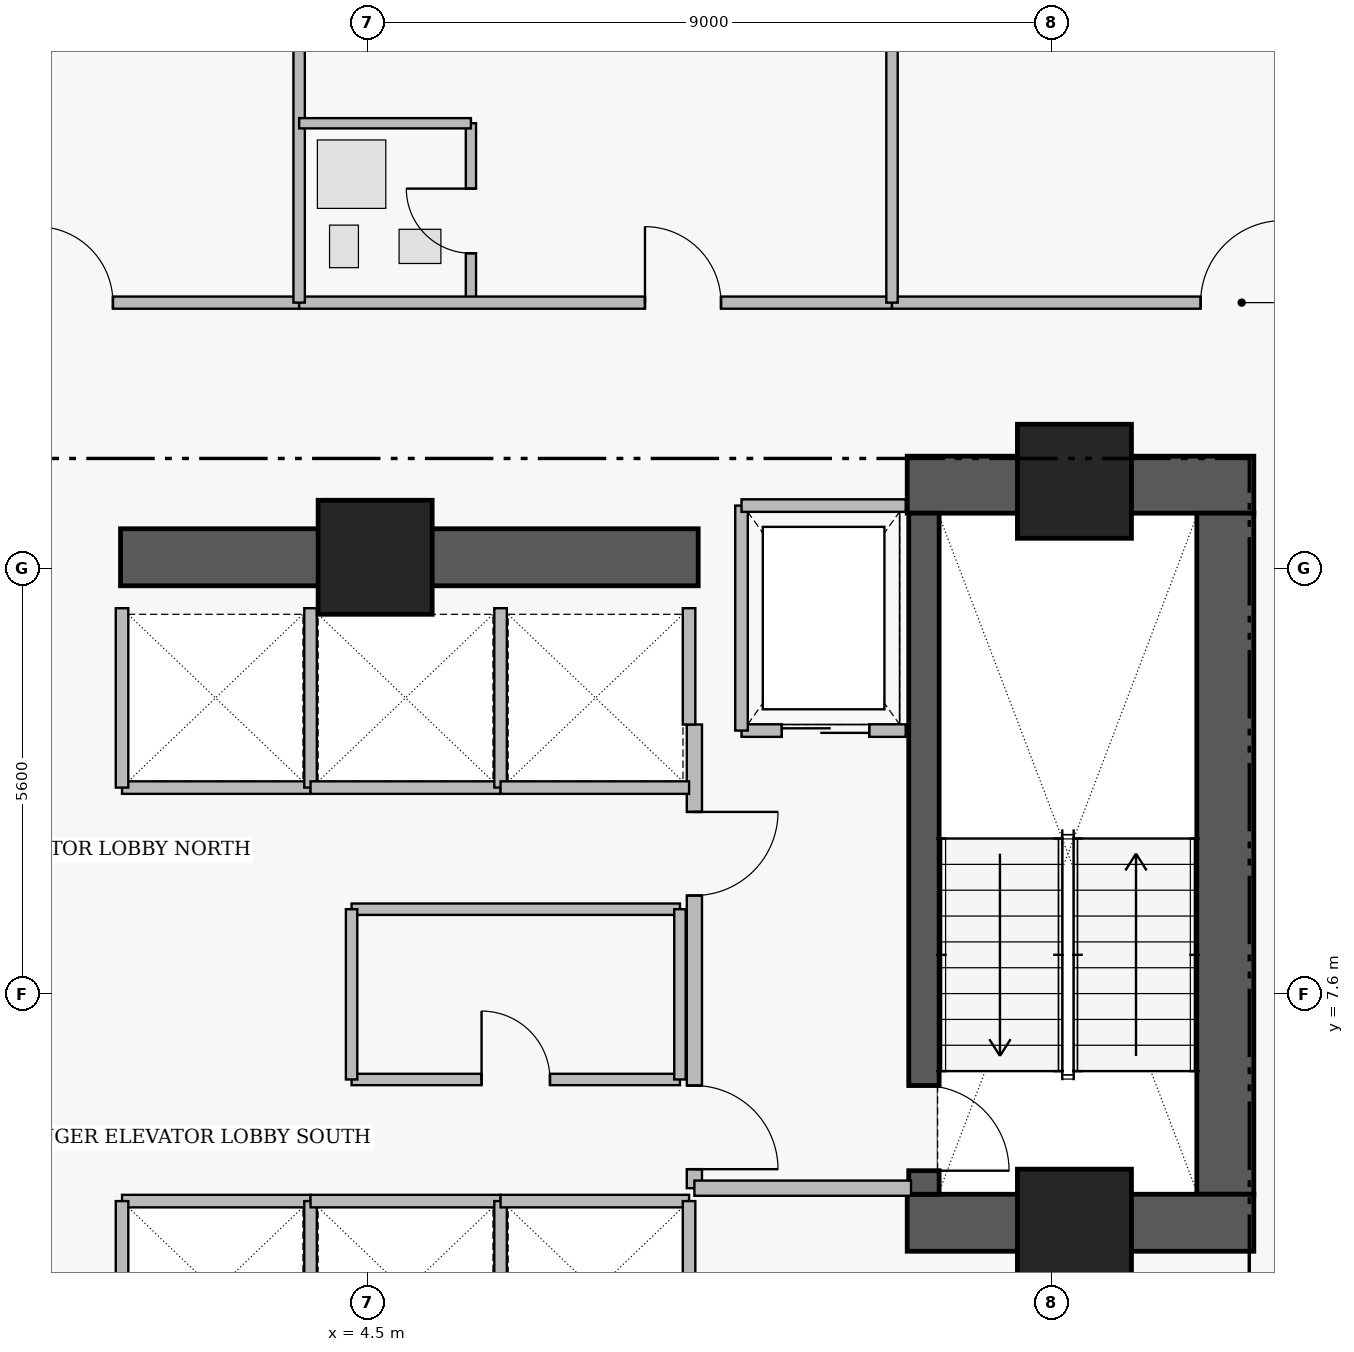
"""IFC4 building model, lengths in metres.
Left out: names, types, materials, properties, quantities, classifications, styles, units other than length and angle.
Written with IfcOpenShell. Run it as: python <this file> out.ifc"""

import sys

from ifc_helpers import new_model, si_unit, direction, frame, frame_2d, origin, origin_2d, place, context, subcontext, project, spatial, rectangle, extrude, element, fill, save


model = new_model("IFC4")
c1 = context("Model", 3, precision=1e-05, world=origin(), true_north=direction((0.0, 1.0)))
c2 = subcontext(c1, "Body", "Model", "MODEL_VIEW")
j1 = project(units=[si_unit("LENGTHUNIT", "METRE"), si_unit("PLANEANGLEUNIT", "RADIAN")], contexts=[c1])
p1 = place(None, origin())
s1 = spatial("IfcSite", under=j1, at=p1, CompositionType="ELEMENT")
p2 = place(p1, origin())
s2 = spatial("IfcBuilding", under=s1, at=p2, CompositionType="ELEMENT")
p3 = place(p2, frame((0.0, 0.0, 117.55)))
s3 = spatial("IfcBuildingStorey", under=s2, at=p3, CompositionType="ELEMENT", Elevation=117.55)
p4 = place(p3, frame((11.6, 14.305, 0.0), z_axis=(0.0, 0.0, 1.0), x_axis=(1.0, 0.0, 0.0)))
e1 = element("IfcWall", 1, at=p4, inside=s3, PredefinedType="SHEAR", context=c2, shape_type="SweptSolid", body=[
    extrude(rectangle(XDim=4.56, YDim=0.75, at=frame_2d((2.28, 0.0))), origin(), (0.0, 0.0, 1.0), 3.46),
])
p5 = place(p3, frame((15.785, 4.97, 0.0), z_axis=(0.0, 0.0, 1.0), x_axis=(0.0, 1.0, 0.0)))
e2 = element("IfcWall", 2, at=p5, inside=s3, PredefinedType="SHEAR", context=c2, shape_type="SweptSolid", body=[
    extrude(rectangle(XDim=8.96, YDim=0.75, at=frame_2d((4.48, 0.0))), origin(), (0.0, 0.0, 1.0), 3.46),
])
p6 = place(p3, frame((11.6, 4.595, 0.0), z_axis=(0.0, 0.0, 1.0), x_axis=(1.0, 0.0, 0.0)))
e3 = element("IfcWall", 3, at=p6, inside=s3, PredefinedType="SHEAR", context=c2, shape_type="SweptSolid", body=[
    extrude(rectangle(XDim=4.56, YDim=0.75, at=frame_2d((2.28, 0.0))), origin(), (0.0, 0.0, 1.0), 3.46),
])
p7 = place(p3, frame((1.25, 13.35, 0.0), z_axis=(0.0, 0.0, 1.0), x_axis=(1.0, 0.0, 0.0)))
e4 = element("IfcWall", 4, at=p7, inside=s3, PredefinedType="SHEAR", context=c2, shape_type="SweptSolid", body=[
    extrude(rectangle(XDim=7.6, YDim=0.75, at=frame_2d((3.8, 0.0))), origin(), (0.0, 0.0, 1.0), 3.43),
])
p8 = place(p3, frame((11.82, 13.93, 0.0), z_axis=(0.0, 0.0, 1.0), x_axis=(0.0, -1.0, 0.0)))
e5 = element("IfcWall", 5, at=p8, inside=s3, PredefinedType="SHEAR", context=c2, shape_type="SweptSolid", body=[
    extrude(rectangle(XDim=8.96, YDim=0.4, at=frame_2d((4.48, 0.0))), origin(), (0.0, 0.0, 1.0), 3.46),
])
p9 = place(p8, frame((7.53, 0.0, 0.0)))
e6 = element("IfcOpeningElement", 6, at=p9, cuts=e5, PredefinedType="OPENING", context=c2, shape_type="SweptSolid", body=[
    extrude(rectangle(XDim=1.12, YDim=2.22, at=frame_2d((0.56, 1.11))), frame((0.0, 0.21, 0.0), z_axis=(0.0, -1.0, 0.0), x_axis=(1.0, 0.0, 0.0)), (0.0, 0.0, 1.0), 0.42),
])
for number, where, z_axis, x_axis in (
    (7, (4.6, 13.35, 0.0), (0.0, 0.0, 1.0), (1.0, 0.0, 0.0)),
    (8, (13.8, 14.35, 0.0), (0.0, 0.0, 1.0), (1.0, 0.0, 0.0)),
    (9, (13.8, 4.55, 0.0), (0.0, 0.0, 1.0), (1.0, 0.0, 0.0)),
):
    element("IfcColumn", number, at=place(p3, frame(where, z_axis=z_axis, x_axis=x_axis)), inside=s3, PredefinedType="COLUMN", context=c2, shape_type="SweptSolid", body=[
        extrude(rectangle(XDim=1.5, YDim=1.5, at=origin_2d()), origin(), (0.0, 0.0, 1.0), 3.65),
    ])
p10 = place(p3, frame((8.8, 11.15, 0.0), z_axis=(0.0, 0.0, 1.0), x_axis=(0.0, -1.0, 0.0)))
e10 = element("IfcWall", 10, at=p10, inside=s3, PredefinedType="PARTITIONING", context=c2, shape_type="SweptSolid", body=[
    extrude(rectangle(XDim=6.1, YDim=0.2, at=frame_2d((3.05, 0.0))), origin(), (0.0, 0.0, 1.0), 3.43),
])
p11 = place(p10, frame((1.15, 0.0, 0.0)))
e11 = element("IfcOpeningElement", 11, at=p11, cuts=e10, PredefinedType="OPENING", context=c2, shape_type="SweptSolid", body=[
    extrude(rectangle(XDim=1.1, YDim=2.2, at=frame_2d((0.55, 1.1))), frame((0.0, 0.11, 0.0), z_axis=(0.0, -1.0, 0.0), x_axis=(1.0, 0.0, 0.0)), (0.0, 0.0, 1.0), 0.22),
])
p12 = place(p10, frame((4.75, 0.0, 0.0)))
e12 = element("IfcOpeningElement", 12, at=p12, cuts=e10, PredefinedType="OPENING", context=c2, shape_type="SweptSolid", body=[
    extrude(rectangle(XDim=1.1, YDim=2.2, at=frame_2d((0.55, 1.1))), frame((0.0, 0.11, 0.0), z_axis=(0.0, -1.0, 0.0), x_axis=(1.0, 0.0, 0.0)), (0.0, 0.0, 1.0), 0.22),
])
p13 = place(p3, frame((9.42, 11.07, 0.0), z_axis=(0.0, 0.0, 1.0), x_axis=(1.0, 0.0, 0.0)))
e13 = element("IfcWall", 13, at=p13, inside=s3, PredefinedType="PARTITIONING", context=c2, shape_type="SweptSolid", body=[
    extrude(rectangle(XDim=2.16, YDim=0.165, at=frame_2d((1.08, 0.0))), origin(), (0.0, 0.0, 1.0), 3.43),
])
p14 = place(p13, frame((0.53, 0.0, 0.0)))
e14 = element("IfcOpeningElement", 14, at=p14, cuts=e13, PredefinedType="OPENING", context=c2, shape_type="SweptSolid", body=[
    extrude(rectangle(XDim=1.15, YDim=2.25, at=frame_2d((0.575, 1.125))), frame((0.0, 0.093, 0.0), z_axis=(0.0, -1.0, 0.0), x_axis=(1.0, 0.0, 0.0)), (0.0, 0.0, 1.0), 0.185),
])
p15 = place(p3, frame((4.29, 6.48, 0.0), z_axis=(0.0, 0.0, 1.0), x_axis=(1.0, 0.0, 0.0)))
e15 = element("IfcWall", 15, at=p15, inside=s3, PredefinedType="PARTITIONING", context=c2, shape_type="SweptSolid", body=[
    extrude(rectangle(XDim=4.32, YDim=0.15, at=frame_2d((2.16, 0.0))), origin(), (0.0, 0.0, 1.0), 3.43),
])
p16 = place(p15, frame((1.71, 0.0, 0.0)))
e16 = element("IfcOpeningElement", 16, at=p16, cuts=e15, PredefinedType="OPENING", context=c2, shape_type="SweptSolid", body=[
    extrude(rectangle(XDim=0.9, YDim=2.15, at=frame_2d((0.45, 1.075))), frame((0.0, 0.085, 0.0), z_axis=(0.0, -1.0, 0.0), x_axis=(1.0, 0.0, 0.0)), (0.0, 0.0, 1.0), 0.17),
])
p17 = place(p3, frame((-4.6, 16.7, 0.0), z_axis=(0.0, 0.0, 1.0), x_axis=(1.0, 0.0, 0.0)))
e17 = element("IfcWall", 17, at=p17, inside=s3, PredefinedType="PARTITIONING", context=c2, shape_type="SweptSolid", body=[
    extrude(rectangle(XDim=8.2, YDim=0.16, at=frame_2d((4.1, 0.0))), origin(), (0.0, 0.0, 1.0), 2.973),
])
p18 = place(p17, frame((4.75, 0.0, 0.0)))
e18 = element("IfcOpeningElement", 18, at=p18, cuts=e17, PredefinedType="OPENING", context=c2, shape_type="SweptSolid", body=[
    extrude(rectangle(XDim=1.0, YDim=2.15, at=frame_2d((0.5, 1.075))), frame((0.0, 0.09, 0.0), z_axis=(0.0, -1.0, 0.0), x_axis=(1.0, 0.0, 0.0)), (0.0, 0.0, 1.0), 0.18),
])
p19 = place(p3, frame((5.86, 16.7, 0.0), z_axis=(0.0, 0.0, 1.0), x_axis=(0.0, 1.0, 0.0)))
e19 = element("IfcWall", 19, at=p19, inside=s3, PredefinedType="PLUMBINGWALL", context=c2, shape_type="SweptSolid", body=[
    extrude(rectangle(XDim=2.36, YDim=0.135, at=frame_2d((1.18, 0.0))), origin(), (0.0, 0.0, 1.0), 3.43),
])
p20 = place(p19, frame((0.65, 0.0, 0.0)))
e20 = element("IfcOpeningElement", 20, at=p20, cuts=e19, PredefinedType="OPENING", context=c2, shape_type="SweptSolid", body=[
    extrude(rectangle(XDim=0.85, YDim=2.1, at=frame_2d((0.425, 1.05))), frame((0.0, 0.077, 0.0), z_axis=(0.0, -1.0, 0.0), x_axis=(1.0, 0.0, 0.0)), (0.0, 0.0, 1.0), 0.155),
])
p21 = place(p3, frame((3.6, 16.7, 0.0), z_axis=(0.0, 0.0, 1.0), x_axis=(1.0, 0.0, 0.0)))
e21 = element("IfcWall", 21, at=p21, inside=s3, PredefinedType="PARTITIONING", context=c2, shape_type="SweptSolid", body=[
    extrude(rectangle(XDim=7.8, YDim=0.16, at=frame_2d((3.9, 0.0))), origin(), (0.0, 0.0, 1.0), 2.973),
])
p22 = place(p21, frame((4.55, 0.0, 0.0)))
e22 = element("IfcOpeningElement", 22, at=p22, cuts=e21, PredefinedType="OPENING", context=c2, shape_type="SweptSolid", body=[
    extrude(rectangle(XDim=1.0, YDim=2.15, at=frame_2d((0.5, 1.075))), frame((0.0, 0.09, 0.0), z_axis=(0.0, -1.0, 0.0), x_axis=(1.0, 0.0, 0.0)), (0.0, 0.0, 1.0), 0.18),
])
p23 = place(p3, frame((11.4, 16.7, 0.0), z_axis=(0.0, 0.0, 1.0), x_axis=(1.0, 0.0, 0.0)))
e23 = element("IfcWall", 23, at=p23, inside=s3, PredefinedType="PARTITIONING", context=c2, shape_type="SweptSolid", body=[
    extrude(rectangle(XDim=9.2, YDim=0.16, at=frame_2d((4.6, 0.0))), origin(), (0.0, 0.0, 1.0), 2.973),
])
p24 = place(p23, frame((4.06, 0.0, 0.0)))
e24 = element("IfcOpeningElement", 24, at=p24, cuts=e23, PredefinedType="OPENING", context=c2, shape_type="SweptSolid", body=[
    extrude(rectangle(XDim=1.08, YDim=2.18, at=frame_2d((0.54, 1.09))), frame((0.0, 0.09, 0.0), z_axis=(0.0, -1.0, 0.0), x_axis=(1.0, 0.0, 0.0)), (0.0, 0.0, 1.0), 0.18),
])
p25 = place(p3, frame((8.8, 5.05, 0.0), z_axis=(0.0, 0.0, 1.0), x_axis=(1.0, 0.0, 0.0)))
e25 = element("IfcWall", 25, at=p25, inside=s3, PredefinedType="PARTITIONING", context=c2, shape_type="SweptSolid", body=[
    extrude(rectangle(XDim=2.85, YDim=0.2, at=frame_2d((1.425, 0.0))), origin(), (0.0, 0.0, 1.0), 3.43),
])
p26 = place(p3, frame((9.42, 11.07, 0.0), z_axis=(0.0, 0.0, 1.0), x_axis=(0.0, 1.0, 0.0)))
e26 = element("IfcWall", 26, at=p26, inside=s3, PredefinedType="PARTITIONING", context=c2, shape_type="SweptSolid", body=[
    extrude(rectangle(XDim=2.96, YDim=0.165, at=frame_2d((1.48, 0.0))), origin(), (0.0, 0.0, 1.0), 3.43),
])
p27 = place(p3, frame((9.42, 14.03, 0.0), z_axis=(0.0, 0.0, 1.0), x_axis=(1.0, 0.0, 0.0)))
e27 = element("IfcWall", 27, at=p27, inside=s3, PredefinedType="PARTITIONING", context=c2, shape_type="SweptSolid", body=[
    extrude(rectangle(XDim=2.16, YDim=0.165, at=frame_2d((1.08, 0.0))), origin(), (0.0, 0.0, 1.0), 3.43),
])
p28 = place(p3, frame((1.27, 4.88, 0.0), z_axis=(0.0, 0.0, 1.0), x_axis=(1.0, 0.0, 0.0)))
e28 = element("IfcWall", 28, at=p28, inside=s3, PredefinedType="PARTITIONING", context=c2, shape_type="SweptSolid", body=[
    extrude(rectangle(XDim=2.48, YDim=0.165, at=frame_2d((1.24, 0.0))), origin(), (0.0, 0.0, 1.0), 3.43),
])
for number, where, z_axis, x_axis in (
    (29, (1.27, 2.52, 0.0), (0.0, 0.0, 1.0), (0.0, 1.0, 0.0)),
    (30, (3.75, 2.52, 0.0), (0.0, 0.0, 1.0), (0.0, 1.0, 0.0)),
):
    element("IfcWall", number, at=place(p3, frame(where, z_axis=z_axis, x_axis=x_axis)), inside=s3, PredefinedType="PARTITIONING", context=c2, shape_type="SweptSolid", body=[
        extrude(rectangle(XDim=2.36, YDim=0.165, at=frame_2d((1.18, 0.0))), origin(), (0.0, 0.0, 1.0), 3.43),
    ])
p29 = place(p3, frame((1.27, 10.32, 0.0), z_axis=(0.0, 0.0, 1.0), x_axis=(1.0, 0.0, 0.0)))
e31 = element("IfcWall", 31, at=p29, inside=s3, PredefinedType="PARTITIONING", context=c2, shape_type="SweptSolid", body=[
    extrude(rectangle(XDim=2.48, YDim=0.165, at=frame_2d((1.24, 0.0))), origin(), (0.0, 0.0, 1.0), 3.43),
])
for number, where, z_axis, x_axis in (
    (32, (1.27, 10.32, 0.0), (0.0, 0.0, 1.0), (0.0, 1.0, 0.0)),
    (33, (3.75, 10.32, 0.0), (0.0, 0.0, 1.0), (0.0, 1.0, 0.0)),
):
    element("IfcWall", number, at=place(p3, frame(where, z_axis=z_axis, x_axis=x_axis)), inside=s3, PredefinedType="PARTITIONING", context=c2, shape_type="SweptSolid", body=[
        extrude(rectangle(XDim=2.36, YDim=0.165, at=frame_2d((1.18, 0.0))), origin(), (0.0, 0.0, 1.0), 3.43),
    ])
p30 = place(p3, frame((3.75, 4.88, 0.0), z_axis=(0.0, 0.0, 1.0), x_axis=(1.0, 0.0, 0.0)))
e34 = element("IfcWall", 34, at=p30, inside=s3, PredefinedType="PARTITIONING", context=c2, shape_type="SweptSolid", body=[
    extrude(rectangle(XDim=2.5, YDim=0.165, at=frame_2d((1.25, 0.0))), origin(), (0.0, 0.0, 1.0), 3.43),
])
p31 = place(p3, frame((6.25, 2.52, 0.0), z_axis=(0.0, 0.0, 1.0), x_axis=(0.0, 1.0, 0.0)))
e35 = element("IfcWall", 35, at=p31, inside=s3, PredefinedType="PARTITIONING", context=c2, shape_type="SweptSolid", body=[
    extrude(rectangle(XDim=2.36, YDim=0.165, at=frame_2d((1.18, 0.0))), origin(), (0.0, 0.0, 1.0), 3.43),
])
p32 = place(p3, frame((6.25, 4.88, 0.0), z_axis=(0.0, 0.0, 1.0), x_axis=(1.0, 0.0, 0.0)))
e36 = element("IfcWall", 36, at=p32, inside=s3, PredefinedType="PARTITIONING", context=c2, shape_type="SweptSolid", body=[
    extrude(rectangle(XDim=2.48, YDim=0.165, at=frame_2d((1.24, 0.0))), origin(), (0.0, 0.0, 1.0), 3.43),
])
p33 = place(p3, frame((8.73, 2.52, 0.0), z_axis=(0.0, 0.0, 1.0), x_axis=(0.0, 1.0, 0.0)))
e37 = element("IfcWall", 37, at=p33, inside=s3, PredefinedType="PARTITIONING", context=c2, shape_type="SweptSolid", body=[
    extrude(rectangle(XDim=2.36, YDim=0.165, at=frame_2d((1.18, 0.0))), origin(), (0.0, 0.0, 1.0), 3.43),
])
p34 = place(p3, frame((3.75, 10.32, 0.0), z_axis=(0.0, 0.0, 1.0), x_axis=(1.0, 0.0, 0.0)))
e38 = element("IfcWall", 38, at=p34, inside=s3, PredefinedType="PARTITIONING", context=c2, shape_type="SweptSolid", body=[
    extrude(rectangle(XDim=2.5, YDim=0.165, at=frame_2d((1.25, 0.0))), origin(), (0.0, 0.0, 1.0), 3.43),
])
p35 = place(p3, frame((6.25, 10.32, 0.0), z_axis=(0.0, 0.0, 1.0), x_axis=(0.0, 1.0, 0.0)))
e39 = element("IfcWall", 39, at=p35, inside=s3, PredefinedType="PARTITIONING", context=c2, shape_type="SweptSolid", body=[
    extrude(rectangle(XDim=2.36, YDim=0.165, at=frame_2d((1.18, 0.0))), origin(), (0.0, 0.0, 1.0), 3.43),
])
p36 = place(p3, frame((6.25, 10.32, 0.0), z_axis=(0.0, 0.0, 1.0), x_axis=(1.0, 0.0, 0.0)))
e40 = element("IfcWall", 40, at=p36, inside=s3, PredefinedType="PARTITIONING", context=c2, shape_type="SweptSolid", body=[
    extrude(rectangle(XDim=2.48, YDim=0.165, at=frame_2d((1.24, 0.0))), origin(), (0.0, 0.0, 1.0), 3.43),
])
p37 = place(p3, frame((8.73, 11.15, 0.0), z_axis=(0.0, 0.0, 1.0), x_axis=(0.0, 1.0, 0.0)))
e41 = element("IfcWall", 41, at=p37, inside=s3, PredefinedType="PARTITIONING", context=c2, shape_type="SweptSolid", body=[
    extrude(rectangle(XDim=1.53, YDim=0.165, at=frame_2d((0.765, 0.0))), origin(), (0.0, 0.0, 1.0), 3.43),
])
p38 = place(p3, frame((4.29, 8.72, 0.0), z_axis=(0.0, 0.0, 1.0), x_axis=(1.0, 0.0, 0.0)))
e42 = element("IfcWall", 42, at=p38, inside=s3, PredefinedType="PARTITIONING", context=c2, shape_type="SweptSolid", body=[
    extrude(rectangle(XDim=4.32, YDim=0.15, at=frame_2d((2.16, 0.0))), origin(), (0.0, 0.0, 1.0), 3.43),
])
for number, where, z_axis, x_axis in (
    (43, (4.29, 6.48, 0.0), (0.0, 0.0, 1.0), (0.0, 1.0, 0.0)),
    (44, (8.61, 6.48, 0.0), (0.0, 0.0, 1.0), (0.0, 1.0, 0.0)),
):
    element("IfcWall", number, at=place(p3, frame(where, z_axis=z_axis, x_axis=x_axis)), inside=s3, PredefinedType="PARTITIONING", context=c2, shape_type="SweptSolid", body=[
        extrude(rectangle(XDim=2.24, YDim=0.15, at=frame_2d((1.12, 0.0))), origin(), (0.0, 0.0, 1.0), 3.43),
    ])
p39 = place(p3, frame((3.6, 16.7, 0.0), z_axis=(0.0, 0.0, 1.0), x_axis=(0.0, 1.0, 0.0)))
e45 = element("IfcWall", 45, at=p39, inside=s3, PredefinedType="PARTITIONING", context=c2, shape_type="SweptSolid", body=[
    extrude(rectangle(XDim=11.62, YDim=0.15, at=frame_2d((5.81, 0.0))), origin(), (0.0, 0.0, 1.0), 3.43),
])
p40 = place(p3, frame((3.6, 19.06, 0.0), z_axis=(0.0, 0.0, 1.0), x_axis=(1.0, 0.0, 0.0)))
e46 = element("IfcWall", 46, at=p40, inside=s3, PredefinedType="PLUMBINGWALL", context=c2, shape_type="SweptSolid", body=[
    extrude(rectangle(XDim=2.26, YDim=0.135, at=frame_2d((1.13, 0.0))), origin(), (0.0, 0.0, 1.0), 2.973),
])
p41 = place(p3, frame((11.4, 16.7, 0.0), z_axis=(0.0, 0.0, 1.0), x_axis=(0.0, 1.0, 0.0)))
e47 = element("IfcWall", 47, at=p41, inside=s3, PredefinedType="PARTITIONING", context=c2, shape_type="SweptSolid", body=[
    extrude(rectangle(XDim=11.62, YDim=0.15, at=frame_2d((5.81, 0.0))), origin(), (0.0, 0.0, 1.0), 3.43),
])
p42 = place(p9, origin())
e48 = element("IfcDoor", 48, at=p42, inside=s3, OperationType="SINGLE_SWING_RIGHT", PredefinedType="DOOR", context=c2, shape_type="SweptSolid", body=[
    extrude(rectangle(XDim=1.12, YDim=2.22, at=frame_2d((0.56, 1.11))), frame((0.0, 0.025, 0.0), z_axis=(0.0, -1.0, 0.0), x_axis=(1.0, 0.0, 0.0)), (0.0, 0.0, 1.0), 0.05),
])
fill(e6, e48)
p43 = place(p11, origin())
e49 = element("IfcDoor", 49, at=p43, inside=s3, OperationType="SINGLE_SWING_LEFT", PredefinedType="DOOR", context=c2, shape_type="SweptSolid", body=[
    extrude(rectangle(XDim=1.1, YDim=2.2, at=frame_2d((0.55, 1.1))), frame((0.0, 0.025, 0.0), z_axis=(0.0, -1.0, 0.0), x_axis=(1.0, 0.0, 0.0)), (0.0, 0.0, 1.0), 0.05),
])
fill(e11, e49)
p44 = place(p12, origin())
e50 = element("IfcDoor", 50, at=p44, inside=s3, OperationType="SINGLE_SWING_RIGHT", PredefinedType="DOOR", context=c2, shape_type="SweptSolid", body=[
    extrude(rectangle(XDim=1.1, YDim=2.2, at=frame_2d((0.55, 1.1))), frame((0.0, 0.025, 0.0), z_axis=(0.0, -1.0, 0.0), x_axis=(1.0, 0.0, 0.0)), (0.0, 0.0, 1.0), 0.05),
])
fill(e12, e50)
p45 = place(p14, origin())
e51 = element("IfcDoor", 51, at=p45, inside=s3, OperationType="SLIDING_TO_LEFT", PredefinedType="DOOR", context=c2, shape_type="SweptSolid", body=[
    extrude(rectangle(XDim=1.15, YDim=2.25, at=frame_2d((0.575, 1.125))), frame((0.0, 0.025, 0.0), z_axis=(0.0, -1.0, 0.0), x_axis=(1.0, 0.0, 0.0)), (0.0, 0.0, 1.0), 0.05),
])
fill(e14, e51)
p46 = place(p16, origin())
e52 = element("IfcDoor", 52, at=p46, inside=s3, OperationType="SINGLE_SWING_LEFT", PredefinedType="DOOR", context=c2, shape_type="SweptSolid", body=[
    extrude(rectangle(XDim=0.9, YDim=2.15, at=frame_2d((0.45, 1.075))), frame((0.0, 0.025, 0.0), z_axis=(0.0, -1.0, 0.0), x_axis=(1.0, 0.0, 0.0)), (0.0, 0.0, 1.0), 0.05),
])
fill(e16, e52)
p47 = place(p18, origin())
e53 = element("IfcDoor", 53, at=p47, inside=s3, OperationType="SINGLE_SWING_LEFT", PredefinedType="DOOR", context=c2, shape_type="SweptSolid", body=[
    extrude(rectangle(XDim=1.0, YDim=2.15, at=frame_2d((0.5, 1.075))), frame((0.0, 0.025, 0.0), z_axis=(0.0, -1.0, 0.0), x_axis=(1.0, 0.0, 0.0)), (0.0, 0.0, 1.0), 0.05),
])
fill(e18, e53)
p48 = place(p20, origin())
e54 = element("IfcDoor", 54, at=p48, inside=s3, OperationType="SINGLE_SWING_RIGHT", PredefinedType="DOOR", context=c2, shape_type="SweptSolid", body=[
    extrude(rectangle(XDim=0.85, YDim=2.1, at=frame_2d((0.425, 1.05))), frame((0.0, 0.025, 0.0), z_axis=(0.0, -1.0, 0.0), x_axis=(1.0, 0.0, 0.0)), (0.0, 0.0, 1.0), 0.05),
])
fill(e20, e54)
p49 = place(p22, origin())
e55 = element("IfcDoor", 55, at=p49, inside=s3, OperationType="SINGLE_SWING_LEFT", PredefinedType="DOOR", context=c2, shape_type="SweptSolid", body=[
    extrude(rectangle(XDim=1.0, YDim=2.15, at=frame_2d((0.5, 1.075))), frame((0.0, 0.025, 0.0), z_axis=(0.0, -1.0, 0.0), x_axis=(1.0, 0.0, 0.0)), (0.0, 0.0, 1.0), 0.05),
])
fill(e22, e55)
p50 = place(p24, origin())
e56 = element("IfcDoor", 56, at=p50, inside=s3, OperationType="SINGLE_SWING_RIGHT", PredefinedType="DOOR", context=c2, shape_type="SweptSolid", body=[
    extrude(rectangle(XDim=1.08, YDim=2.18, at=frame_2d((0.54, 1.09))), frame((0.0, 0.025, 0.0), z_axis=(0.0, -1.0, 0.0), x_axis=(1.0, 0.0, 0.0)), (0.0, 0.0, 1.0), 0.05),
])
fill(e24, e56)
save(model, sys.argv[1])
